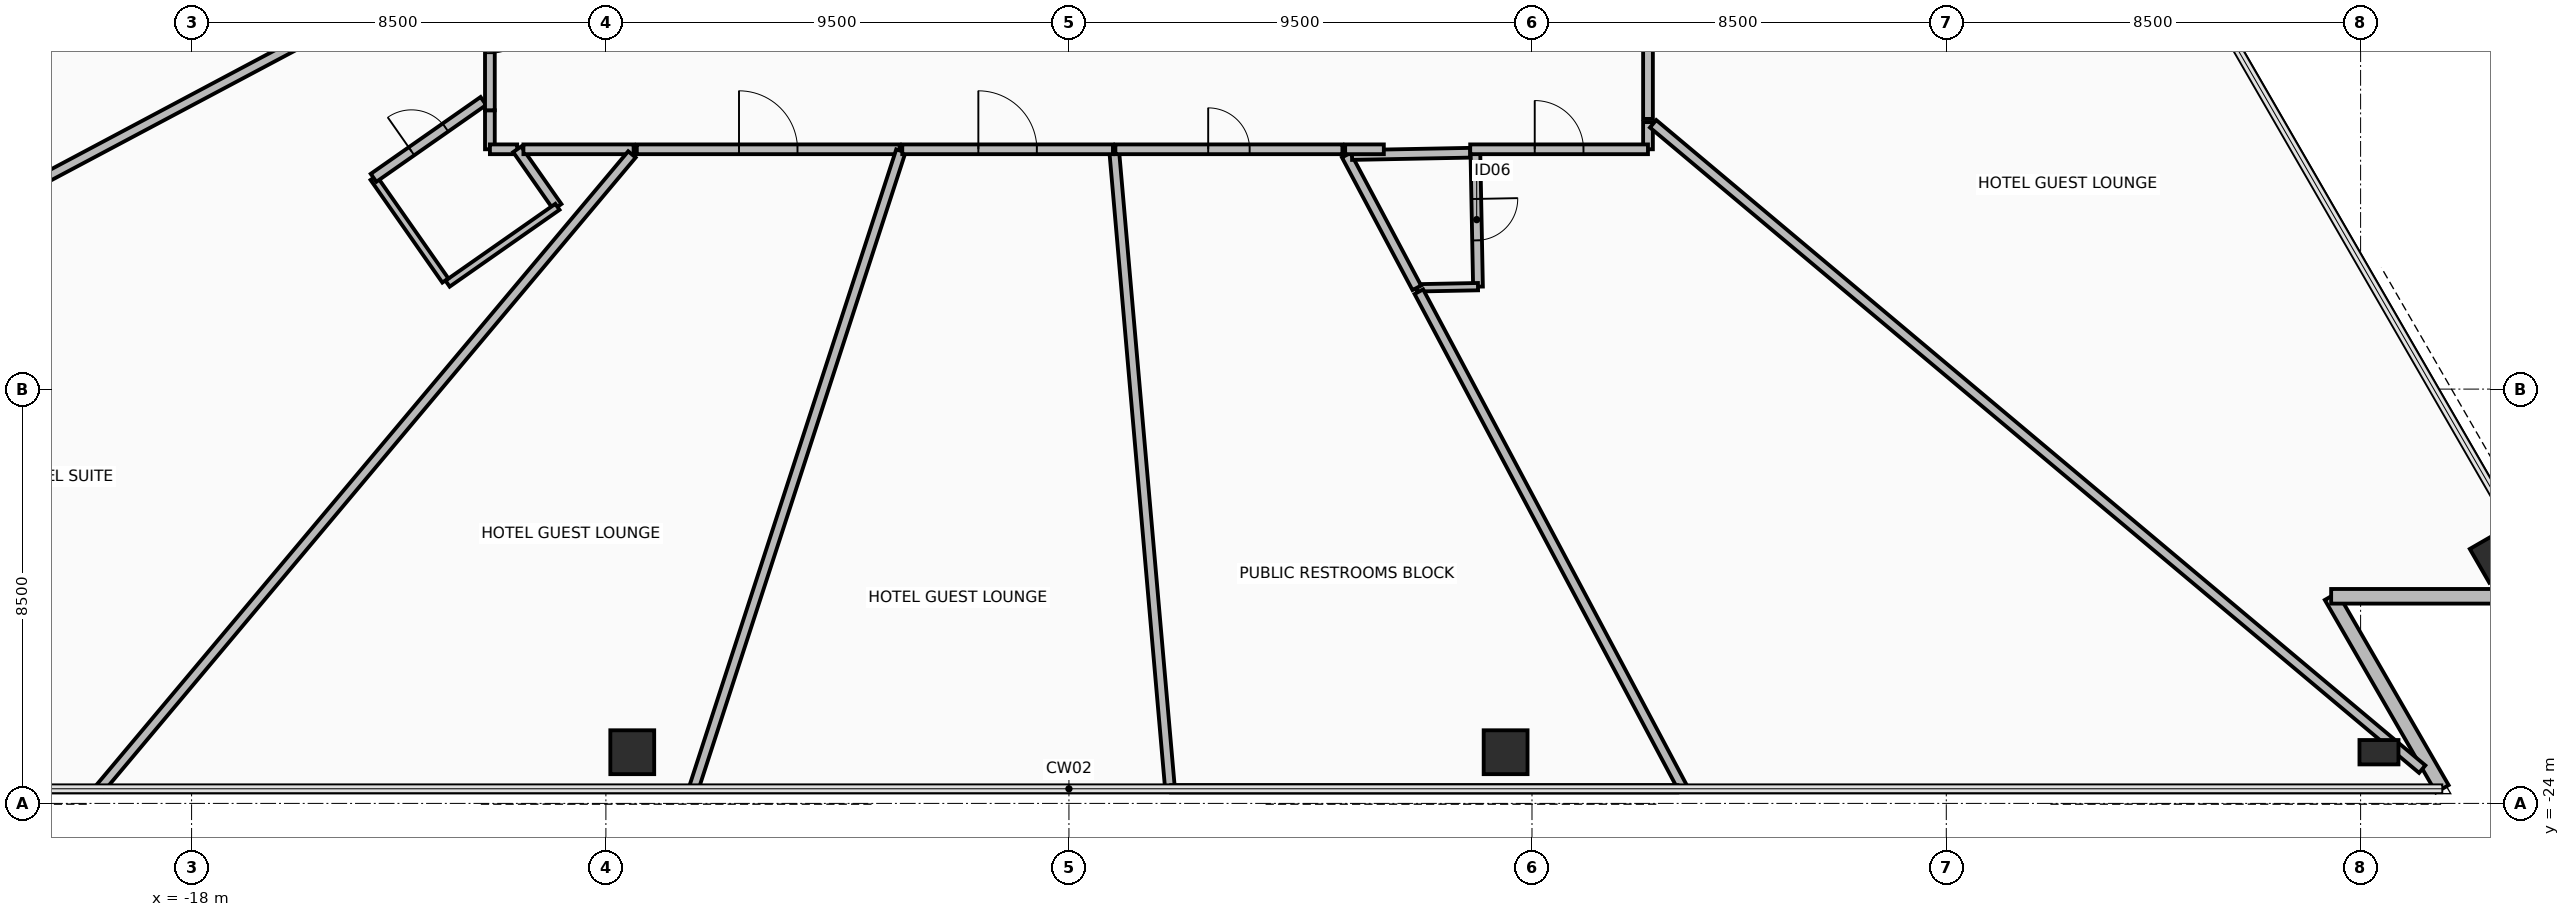
"""IFC4 building model, lengths in metres.
Left out: names, types, materials, properties, quantities, classifications, styles, units other than length and angle.
Written with IfcOpenShell. Run it as: python <this file> out.ifc"""

import sys

from ifc_helpers import new_model, si_unit, direction, frame, frame_2d, origin, origin_2d, place, context, subcontext, project, spatial, rectangle, hollow_rectangle, extrude, element, fill, save


model = new_model("IFC4")
c1 = context("Model", 3, precision=1e-05, world=origin(), true_north=direction((0.0, 1.0)))
c2 = subcontext(c1, "Body", "Model", "MODEL_VIEW")
j1 = project(units=[si_unit("LENGTHUNIT", "METRE"), si_unit("PLANEANGLEUNIT", "RADIAN")], contexts=[c1])
p1 = place(None, origin())
s1 = spatial("IfcSite", under=j1, at=p1, CompositionType="ELEMENT")
p2 = place(p1, origin())
s2 = spatial("IfcBuilding", under=s1, at=p2, CompositionType="ELEMENT")
p3 = place(p2, frame((0.0, 0.0, 38.65)))
s3 = spatial("IfcBuildingStorey", under=s2, at=p3, CompositionType="ELEMENT", Elevation=38.65)
for number, where, z_axis, x_axis in (
    (1, (-8.959, -22.95, 0.0), (0.0, 0.0, 1.0), (1.0, 0.0, 0.0)),
    (2, (8.959, -22.95, 0.0), (0.0, 0.0, 1.0), (1.0, 0.0, 0.0)),
):
    element("IfcColumn", number, at=place(p3, frame(where, z_axis=z_axis, x_axis=x_axis)), inside=s3, PredefinedType="COLUMN", context=c2, shape_type="SweptSolid", body=[
        extrude(hollow_rectangle(XDim=0.9, YDim=0.9, WallThickness=0.05, at=origin_2d()), origin(), (0.0, 0.0, 1.0), 3.4),
    ])
for number, where, z_axis, x_axis in (
    (3, (26.877, -22.95, 0.0), (0.0, 0.0, 1.0), (1.0, 0.0, 0.0)),
    (4, (29.157, -19.001, 0.0), (0.0, 0.0, 1.0), (-0.5, 0.866, 0.0)),
):
    element("IfcColumn", number, at=place(p3, frame(where, z_axis=z_axis, x_axis=x_axis)), inside=s3, PredefinedType="COLUMN", context=c2, shape_type="SweptSolid", body=[
        extrude(hollow_rectangle(XDim=0.5, YDim=0.8, WallThickness=0.04, at=origin_2d()), origin(), (0.0, 0.0, 1.0), 3.4),
    ])
p4 = place(p3, frame((28.176, -23.7, 0.0), z_axis=(0.0, 0.0, 1.0), x_axis=(-0.500014431597, 0.866017071537, 0.0)))
e5 = element("IfcWall", 5, at=p4, inside=s3, PredefinedType="STANDARD", context=c2, shape_type="SweptSolid", body=[
    extrude(rectangle(XDim=4.56, YDim=0.3, at=frame_2d((2.28, 0.0))), origin(), (0.0, 0.0, 1.0), 2.42),
])
p5 = place(p3, frame((25.896, -19.751, 0.0), z_axis=(0.0, 0.0, 1.0), x_axis=(1.0, 0.0, 0.0)))
e6 = element("IfcWall", 6, at=p5, inside=s3, PredefinedType="STANDARD", context=c2, shape_type="SweptSolid", body=[
    extrude(rectangle(XDim=4.56, YDim=0.3, at=frame_2d((2.28, 0.0))), origin(), (0.0, 0.0, 1.0), 2.42),
])
p6 = place(p3, frame((-11.88, -9.78, 0.0), z_axis=(0.0, 0.0, 1.0), x_axis=(0.0, -1.0, 0.0)))
e7 = element("IfcWall", 7, at=p6, inside=s3, PredefinedType="PARTITIONING", context=c2, shape_type="SweptSolid", body=[
    extrude(rectangle(XDim=0.8, YDim=0.2, at=frame_2d((0.4, 0.0))), origin(), (0.0, 0.0, 1.0), 2.62),
])
p7 = place(p3, frame((-11.879, -10.58, 0.0), z_axis=(0.0, 0.0, 1.0), x_axis=(1.0, 0.0, 0.0)))
e8 = element("IfcWall", 8, at=p7, inside=s3, PredefinedType="PARTITIONING", context=c2, shape_type="SweptSolid", body=[
    extrude(rectangle(XDim=0.559, YDim=0.2, at=frame_2d((0.28, 0.0))), origin(), (0.0, 0.0, 1.0), 3.225),
])
p8 = place(p3, frame((-11.32, -10.58, 0.0), z_axis=(0.0, 0.0, 1.0), x_axis=(0.573177949093, -0.819430923674, 0.0)))
e9 = element("IfcWall", 9, at=p8, inside=s3, PredefinedType="PARTITIONING", context=c2, shape_type="SweptSolid", body=[
    extrude(rectangle(XDim=1.44, YDim=0.2, at=frame_2d((0.72, 0.0))), origin(), (0.0, 0.0, 1.0), 3.225),
])
p9 = place(p3, frame((-10.494, -11.76, 0.0), z_axis=(0.0, 0.0, 1.0), x_axis=(-0.819398712469, -0.573223996361, 0.0)))
e10 = element("IfcWall", 10, at=p9, inside=s3, PredefinedType="PARTITIONING", context=c2, shape_type="SweptSolid", body=[
    extrude(rectangle(XDim=2.75, YDim=0.15, at=frame_2d((1.375, 0.0))), origin(), (0.0, 0.0, 1.0), 3.225),
])
p10 = place(p3, frame((-12.794, -13.271, 0.0), z_axis=(0.0, 0.0, 1.0), x_axis=(-0.573130756233, 0.819463932251, 0.0)))
e11 = element("IfcWall", 11, at=p10, inside=s3, PredefinedType="PARTITIONING", context=c2, shape_type="SweptSolid", body=[
    extrude(rectangle(XDim=2.57, YDim=0.15, at=frame_2d((1.285, 0.0))), origin(), (0.0, 0.0, 1.0), 2.62),
])
p11 = place(p3, frame((-14.267, -11.165, 0.0), z_axis=(0.0, 0.0, 1.0), x_axis=(0.81944041023, 0.573164386614, 0.0)))
e12 = element("IfcWall", 12, at=p11, inside=s3, PredefinedType="PARTITIONING", context=c2, shape_type="SweptSolid", body=[
    extrude(rectangle(XDim=2.75, YDim=0.2, at=frame_2d((1.375, 0.0))), origin(), (0.0, 0.0, 1.0), 2.62),
])
p12 = place(p11, frame((0.95, 0.0, 0.0)))
e13 = element("IfcOpeningElement", 13, at=p12, cuts=e12, PredefinedType="OPENING", context=c2, shape_type="SweptSolid", body=[
    extrude(rectangle(XDim=0.85, YDim=2.1, at=frame_2d((0.425, 1.05))), frame((0.0, 0.11, 0.0), z_axis=(0.0, -1.0, 0.0), x_axis=(1.0, 0.0, 0.0)), (0.0, 0.0, 1.0), 0.22),
])
p13 = place(p3, frame((8.339, -10.649, 0.0), z_axis=(0.0, 0.0, 1.0), x_axis=(0.019353504647, -0.999812703389, 0.0)))
e14 = element("IfcWall", 14, at=p13, inside=s3, PredefinedType="PARTITIONING", context=c2, shape_type="SweptSolid", body=[
    extrude(rectangle(XDim=2.75, YDim=0.2, at=frame_2d((1.375, 0.0))), origin(), (0.0, 0.0, 1.0), 3.225),
])
p14 = place(p13, frame((0.95, 0.0, 0.0)))
e15 = element("IfcOpeningElement", 15, at=p14, cuts=e14, PredefinedType="OPENING", context=c2, shape_type="SweptSolid", body=[
    extrude(rectangle(XDim=0.85, YDim=2.1, at=frame_2d((0.425, 1.05))), frame((0.0, 0.11, 0.0), z_axis=(0.0, -1.0, 0.0), x_axis=(1.0, 0.0, 0.0)), (0.0, 0.0, 1.0), 0.22),
])
p15 = place(p3, frame((8.392, -13.398, 0.0), z_axis=(0.0, 0.0, 1.0), x_axis=(-0.999810947385, -0.01944400909, 0.0)))
e16 = element("IfcWall", 16, at=p15, inside=s3, PredefinedType="PARTITIONING", context=c2, shape_type="SweptSolid", body=[
    extrude(rectangle(XDim=1.256, YDim=0.15, at=frame_2d((0.628, 0.0))), origin(), (0.0, 0.0, 1.0), 3.225),
])
p16 = place(p3, frame((7.137, -13.423, 0.0), z_axis=(0.0, 0.0, 1.0), x_axis=(-0.46943307166, 0.882968057877, 0.0)))
e17 = element("IfcWall", 17, at=p16, inside=s3, PredefinedType="PARTITIONING", context=c2, shape_type="SweptSolid", body=[
    extrude(rectangle(XDim=3.083, YDim=0.2, at=frame_2d((1.542, 0.0))), origin(), (0.0, 0.0, 1.0), 3.225),
])
p17 = place(p3, frame((5.807, -10.698, 0.0), z_axis=(0.0, 0.0, 1.0), x_axis=(0.999811590966, 0.019410887945, 0.0)))
e18 = element("IfcWall", 18, at=p17, inside=s3, PredefinedType="PARTITIONING", context=c2, shape_type="SweptSolid", body=[
    extrude(rectangle(XDim=2.427, YDim=0.2, at=frame_2d((1.214, 0.0))), origin(), (0.0, 0.0, 1.0), 3.225),
])
p18 = place(p3, frame((-11.893, -6.324, 0.0), z_axis=(0.0, 0.0, 1.0), x_axis=(-0.882944790092, -0.469476833985, 0.0)))
e19 = element("IfcWall", 19, at=p18, inside=s3, PredefinedType="PARTITIONING", context=c2, shape_type="SweptSolid", body=[
    extrude(rectangle(XDim=17.667, YDim=0.2, at=frame_2d((8.833, 0.0))), origin(), (0.0, 0.0, 1.0), 2.42),
])
p19 = place(p3, frame((-27.393, -14.446, 0.0), z_axis=(0.0, 0.0, 1.0), x_axis=(0.500003924108, 0.866023138188, 0.0)))
e20 = element("IfcWall", 20, at=p19, inside=s3, PredefinedType="PARTITIONING", context=c2, shape_type="SweptSolid", body=[
    extrude(rectangle(XDim=14.641, YDim=0.15, at=frame_2d((7.321, 0.0))), origin(), (0.0, 0.0, 1.0), 3.225),
])
p20 = place(p3, frame((2.072, -23.677, 0.0), z_axis=(0.0, 0.0, 1.0), x_axis=(-0.087161179376, 0.996194222433, 0.0)))
e21 = element("IfcWall", 21, at=p20, inside=s3, PredefinedType="PARTITIONING", context=c2, shape_type="SweptSolid", body=[
    extrude(rectangle(XDim=13.12, YDim=0.2, at=frame_2d((6.56, 0.0))), origin(), (0.0, 0.0, 1.0), 2.42),
])
p21 = place(p3, frame((0.953, -10.58, 0.0), z_axis=(0.0, 0.0, 1.0), x_axis=(1.0, 0.0, 0.0)))
e22 = element("IfcWall", 22, at=p21, inside=s3, PredefinedType="PARTITIONING", context=c2, shape_type="SweptSolid", body=[
    extrude(rectangle(XDim=4.658, YDim=0.2, at=frame_2d((2.329, 0.0))), origin(), (0.0, 0.0, 1.0), 3.225),
])
p22 = place(p21, frame((1.904, 0.0, 0.0)))
e23 = element("IfcOpeningElement", 23, at=p22, cuts=e22, PredefinedType="OPENING", context=c2, shape_type="SweptSolid", body=[
    extrude(rectangle(XDim=0.85, YDim=2.1, at=frame_2d((0.425, 1.05))), frame((0.0, 0.11, 0.0), z_axis=(0.0, -1.0, 0.0), x_axis=(1.0, 0.0, 0.0)), (0.0, 0.0, 1.0), 0.22),
])
p23 = place(p3, frame((7.179, -13.502, 0.0), z_axis=(0.0, 0.0, 1.0), x_axis=(0.469478708188, -0.882943793544, 0.0)))
e24 = element("IfcWall", 24, at=p23, inside=s3, PredefinedType="PARTITIONING", context=c2, shape_type="SweptSolid", body=[
    extrude(rectangle(XDim=11.55, YDim=0.2, at=frame_2d((5.775, 0.0))), origin(), (0.0, 0.0, 1.0), 2.42),
])
p24 = place(p3, frame((12.483, -23.7, 0.0), z_axis=(0.0, 0.0, 1.0), x_axis=(-1.0, 0.0, 0.0)))
e25 = element("IfcWall", 25, at=p24, inside=s3, PredefinedType="PARTITIONING", context=c2, shape_type="SweptSolid", body=[
    extrude(rectangle(XDim=10.386, YDim=0.15, at=frame_2d((5.193, 0.0))), origin(), (0.0, 0.0, 1.0), 3.225),
])
p25 = place(p3, frame((-11.88, -6.436, 0.0), z_axis=(0.0, 0.0, 1.0), x_axis=(0.0, -1.0, 0.0)))
e26 = element("IfcWall", 26, at=p25, inside=s3, PredefinedType="PARTITIONING", context=c2, shape_type="SweptSolid", body=[
    extrude(rectangle(XDim=3.344, YDim=0.2, at=frame_2d((1.672, 0.0))), origin(), (0.0, 0.0, 1.0), 2.62),
])
p26 = place(p25, frame((1.172, 0.0, 0.0)))
e27 = element("IfcOpeningElement", 27, at=p26, cuts=e26, PredefinedType="OPENING", context=c2, shape_type="SweptSolid", body=[
    extrude(rectangle(XDim=1.0, YDim=2.15, at=frame_2d((0.5, 1.075))), frame((0.0, 0.11, 0.0), z_axis=(0.0, -1.0, 0.0), x_axis=(1.0, 0.0, 0.0)), (0.0, 0.0, 1.0), 0.22),
])
p27 = place(p3, frame((-11.192, -10.58, 0.0), z_axis=(0.0, 0.0, 1.0), x_axis=(1.0, 0.0, 0.0)))
e28 = element("IfcWall", 28, at=p27, inside=s3, PredefinedType="PARTITIONING", context=c2, shape_type="SweptSolid", body=[
    extrude(rectangle(XDim=2.26, YDim=0.2, at=frame_2d((1.13, 0.0))), origin(), (0.0, 0.0, 1.0), 2.62),
])
p28 = place(p3, frame((-8.966, -10.685, 0.0), z_axis=(0.0, 0.0, 1.0), x_axis=(-0.642784617016, -0.766046954258, 0.0)))
e29 = element("IfcWall", 29, at=p28, inside=s3, PredefinedType="PARTITIONING", context=c2, shape_type="SweptSolid", body=[
    extrude(rectangle(XDim=16.978, YDim=0.2, at=frame_2d((8.489, 0.0))), origin(), (0.0, 0.0, 1.0), 2.42),
])
p29 = place(p3, frame((-8.866, -10.58, 0.0), z_axis=(0.0, 0.0, 1.0), x_axis=(1.0, 0.0, 0.0)))
e30 = element("IfcWall", 30, at=p29, inside=s3, PredefinedType="PARTITIONING", context=c2, shape_type="SweptSolid", body=[
    extrude(rectangle(XDim=5.394, YDim=0.2, at=frame_2d((2.697, 0.0))), origin(), (0.0, 0.0, 1.0), 2.62),
])
p30 = place(p29, frame((2.097, 0.0, 0.0)))
e31 = element("IfcOpeningElement", 31, at=p30, cuts=e30, PredefinedType="OPENING", context=c2, shape_type="SweptSolid", body=[
    extrude(rectangle(XDim=1.2, YDim=2.15, at=frame_2d((0.6, 1.075))), frame((0.0, 0.11, 0.0), z_axis=(0.0, -1.0, 0.0), x_axis=(1.0, 0.0, 0.0)), (0.0, 0.0, 1.0), 0.22),
])
p31 = place(p3, frame((-3.448, -10.613, 0.0), z_axis=(0.0, 0.0, 1.0), x_axis=(-0.309029029702, -0.951052605696, 0.0)))
e32 = element("IfcWall", 32, at=p31, inside=s3, PredefinedType="PARTITIONING", context=c2, shape_type="SweptSolid", body=[
    extrude(rectangle(XDim=13.742, YDim=0.2, at=frame_2d((6.871, 0.0))), origin(), (0.0, 0.0, 1.0), 2.42),
])
p32 = place(p3, frame((-3.419, -10.58, 0.0), z_axis=(0.0, 0.0, 1.0), x_axis=(1.0, 0.0, 0.0)))
e33 = element("IfcWall", 33, at=p32, inside=s3, PredefinedType="PARTITIONING", context=c2, shape_type="SweptSolid", body=[
    extrude(rectangle(XDim=4.322, YDim=0.2, at=frame_2d((2.161, 0.0))), origin(), (0.0, 0.0, 1.0), 3.225),
])
p33 = place(p32, frame((1.561, 0.0, 0.0)))
e34 = element("IfcOpeningElement", 34, at=p33, cuts=e33, PredefinedType="OPENING", context=c2, shape_type="SweptSolid", body=[
    extrude(rectangle(XDim=1.2, YDim=2.15, at=frame_2d((0.6, 1.075))), frame((0.0, 0.11, 0.0), z_axis=(0.0, -1.0, 0.0), x_axis=(1.0, 0.0, 0.0)), (0.0, 0.0, 1.0), 0.22),
])
p34 = place(p3, frame((11.88, -10.579, 0.0), z_axis=(0.0, 0.0, 1.0), x_axis=(0.0, 1.0, 0.0)))
e35 = element("IfcWall", 35, at=p34, inside=s3, PredefinedType="PARTITIONING", context=c2, shape_type="SweptSolid", body=[
    extrude(rectangle(XDim=0.557, YDim=0.2, at=frame_2d((0.279, 0.0))), origin(), (0.0, 0.0, 1.0), 2.62),
])
p35 = place(p3, frame((11.985, -10.057, 0.0), z_axis=(0.0, 0.0, 1.0), x_axis=(0.766043557541, -0.642788665076, 0.0)))
e36 = element("IfcWall", 36, at=p35, inside=s3, PredefinedType="PARTITIONING", context=c2, shape_type="SweptSolid", body=[
    extrude(rectangle(XDim=20.598, YDim=0.2, at=frame_2d((10.299, 0.0))), origin(), (0.0, 0.0, 1.0), 2.42),
])
p36 = place(p3, frame((5.667, -10.58, 0.0), z_axis=(0.0, 0.0, 1.0), x_axis=(1.0, 0.0, 0.0)))
e37 = element("IfcWall", 37, at=p36, inside=s3, PredefinedType="PARTITIONING", context=c2, shape_type="SweptSolid", body=[
    extrude(rectangle(XDim=0.793, YDim=0.2, at=frame_2d((0.396, 0.0))), origin(), (0.0, 0.0, 1.0), 3.225),
])
p37 = place(p3, frame((8.232, -10.58, 0.0), z_axis=(0.0, 0.0, 1.0), x_axis=(1.0, 0.0, 0.0)))
e38 = element("IfcWall", 38, at=p37, inside=s3, PredefinedType="PARTITIONING", context=c2, shape_type="SweptSolid", body=[
    extrude(rectangle(XDim=3.647, YDim=0.2, at=frame_2d((1.823, 0.0))), origin(), (0.0, 0.0, 1.0), 2.62),
])
p38 = place(p37, frame((1.324, 0.0, 0.0)))
e39 = element("IfcOpeningElement", 39, at=p38, cuts=e38, PredefinedType="OPENING", context=c2, shape_type="SweptSolid", body=[
    extrude(rectangle(XDim=1.0, YDim=2.15, at=frame_2d((0.5, 1.075))), frame((0.0, 0.11, 0.0), z_axis=(0.0, -1.0, 0.0), x_axis=(1.0, 0.0, 0.0)), (0.0, 0.0, 1.0), 0.22),
])
p39 = place(p3, frame((11.88, -9.957, 0.0), z_axis=(0.0, 0.0, 1.0), x_axis=(0.0, 1.0, 0.0)))
e40 = element("IfcWall", 40, at=p39, inside=s3, PredefinedType="PARTITIONING", context=c2, shape_type="SweptSolid", body=[
    extrude(rectangle(XDim=6.062, YDim=0.2, at=frame_2d((3.031, 0.0))), origin(), (0.0, 0.0, 1.0), 2.62),
])
p40 = place(p39, frame((2.431, 0.0, 0.0)))
e41 = element("IfcOpeningElement", 41, at=p40, cuts=e40, PredefinedType="OPENING", context=c2, shape_type="SweptSolid", body=[
    extrude(rectangle(XDim=1.2, YDim=2.15, at=frame_2d((0.6, 1.075))), frame((0.0, 0.11, 0.0), z_axis=(0.0, -1.0, 0.0), x_axis=(1.0, 0.0, 0.0)), (0.0, 0.0, 1.0), 0.22),
])
p41 = place(p12, origin())
e42 = element("IfcDoor", 42, at=p41, inside=s3, OperationType="SINGLE_SWING_RIGHT", PredefinedType="DOOR", context=c2, shape_type="SweptSolid", body=[
    extrude(rectangle(XDim=0.85, YDim=2.1, at=frame_2d((0.425, 1.05))), frame((0.0, 0.025, 0.0), z_axis=(0.0, -1.0, 0.0), x_axis=(1.0, 0.0, 0.0)), (0.0, 0.0, 1.0), 0.05),
])
fill(e13, e42)
p42 = place(p14, origin())
e43 = element("IfcDoor", 43, at=p42, inside=s3, OperationType="SINGLE_SWING_RIGHT", PredefinedType="DOOR", context=c2, shape_type="SweptSolid", body=[
    extrude(rectangle(XDim=0.85, YDim=2.1, at=frame_2d((0.425, 1.05))), frame((0.0, 0.025, 0.0), z_axis=(0.0, -1.0, 0.0), x_axis=(1.0, 0.0, 0.0)), (0.0, 0.0, 1.0), 0.05),
])
fill(e15, e43)
p43 = place(p22, origin())
e44 = element("IfcDoor", 44, at=p43, inside=s3, OperationType="SINGLE_SWING_RIGHT", PredefinedType="DOOR", context=c2, shape_type="SweptSolid", body=[
    extrude(rectangle(XDim=0.85, YDim=2.1, at=frame_2d((0.425, 1.05))), frame((0.0, 0.025, 0.0), z_axis=(0.0, -1.0, 0.0), x_axis=(1.0, 0.0, 0.0)), (0.0, 0.0, 1.0), 0.05),
])
fill(e23, e44)
p44 = place(p26, origin())
e45 = element("IfcDoor", 45, at=p44, inside=s3, OperationType="SINGLE_SWING_LEFT", PredefinedType="DOOR", context=c2, shape_type="SweptSolid", body=[
    extrude(rectangle(XDim=1.0, YDim=2.15, at=frame_2d((0.5, 1.075))), frame((0.0, 0.025, 0.0), z_axis=(0.0, -1.0, 0.0), x_axis=(1.0, 0.0, 0.0)), (0.0, 0.0, 1.0), 0.05),
])
fill(e27, e45)
p45 = place(p30, origin())
e46 = element("IfcDoor", 46, at=p45, inside=s3, OperationType="SINGLE_SWING_LEFT", PredefinedType="DOOR", context=c2, shape_type="SweptSolid", body=[
    extrude(rectangle(XDim=1.2, YDim=2.15, at=frame_2d((0.6, 1.075))), frame((0.0, 0.025, 0.0), z_axis=(0.0, -1.0, 0.0), x_axis=(1.0, 0.0, 0.0)), (0.0, 0.0, 1.0), 0.05),
])
fill(e31, e46)
p46 = place(p33, origin())
e47 = element("IfcDoor", 47, at=p46, inside=s3, OperationType="SINGLE_SWING_LEFT", PredefinedType="DOOR", context=c2, shape_type="SweptSolid", body=[
    extrude(rectangle(XDim=1.2, YDim=2.15, at=frame_2d((0.6, 1.075))), frame((0.0, 0.025, 0.0), z_axis=(0.0, -1.0, 0.0), x_axis=(1.0, 0.0, 0.0)), (0.0, 0.0, 1.0), 0.05),
])
fill(e34, e47)
p47 = place(p38, origin())
e48 = element("IfcDoor", 48, at=p47, inside=s3, OperationType="SINGLE_SWING_LEFT", PredefinedType="DOOR", context=c2, shape_type="SweptSolid", body=[
    extrude(rectangle(XDim=1.0, YDim=2.15, at=frame_2d((0.5, 1.075))), frame((0.0, 0.025, 0.0), z_axis=(0.0, -1.0, 0.0), x_axis=(1.0, 0.0, 0.0)), (0.0, 0.0, 1.0), 0.05),
])
fill(e39, e48)
save(model, sys.argv[1])
